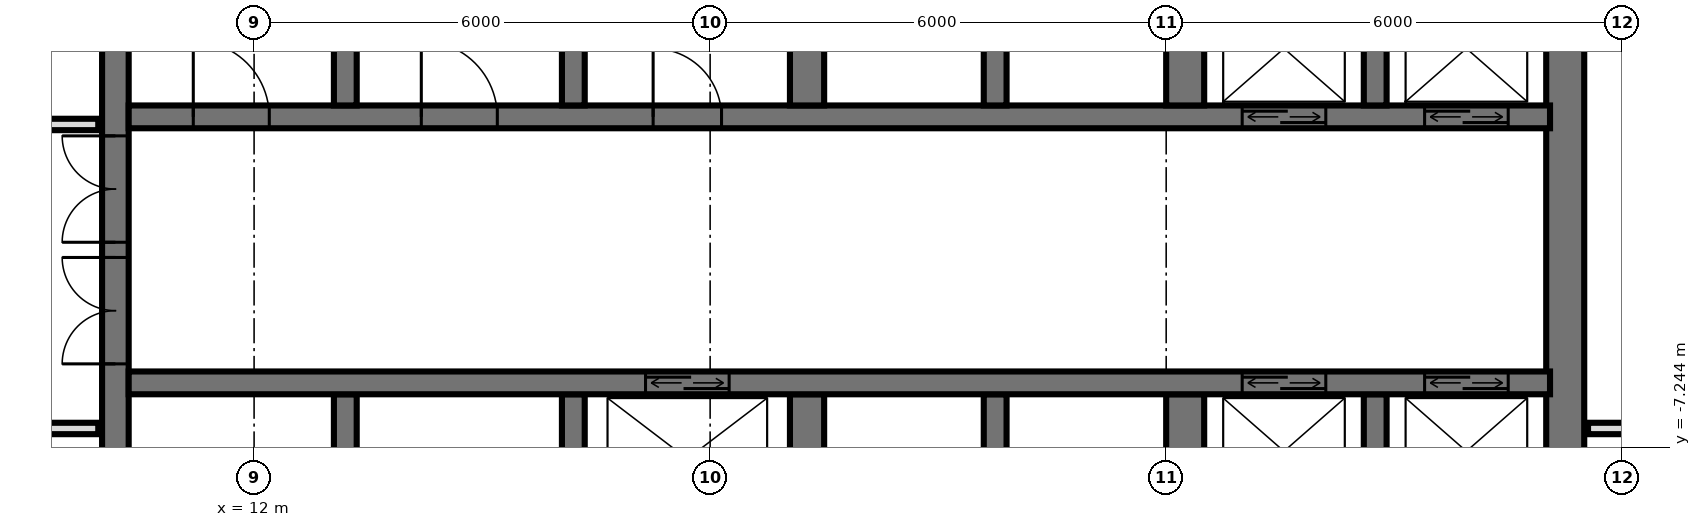
"""IFC4 building model, lengths in metres.
Left out: names, types, materials, properties, quantities, classifications, styles, units other than length and angle.
Written with IfcOpenShell. Run it as: python <this file> out.ifc"""

import sys

from ifc_helpers import new_model, si_unit, direction, frame, frame_2d, origin, place, context, subcontext, project, spatial, rectangle, extrude, element, fill, save


model = new_model("IFC4")
c1 = context("Model", 3, precision=1e-05, world=origin(), true_north=direction((0.0, 1.0)))
c2 = subcontext(c1, "Body", "Model", "MODEL_VIEW")
j1 = project(units=[si_unit("LENGTHUNIT", "METRE"), si_unit("PLANEANGLEUNIT", "RADIAN")], contexts=[c1])
p1 = place(None, origin())
s1 = spatial("IfcSite", under=j1, at=p1, CompositionType="ELEMENT")
p2 = place(p1, origin())
s2 = spatial("IfcBuilding", under=s1, at=p2, CompositionType="ELEMENT")
p3 = place(p2, frame((0.0, 0.0, 103.2)))
s3 = spatial("IfcBuildingStorey", under=s2, at=p3, CompositionType="ELEMENT", Elevation=103.2)
p4 = place(p3, frame((10.175, -14.55, 0.0), z_axis=(0.0, 0.0, 1.0), x_axis=(0.0, 1.0, 0.0)))
e1 = element("IfcWall", 1, at=p4, inside=s3, PredefinedType="SHEAR", context=c2, shape_type="SweptSolid", body=[
    extrude(rectangle(XDim=14.1, YDim=0.35, at=frame_2d((7.05, 0.0))), origin(), (0.0, 0.0, 1.0), 3.6),
])
p5 = place(p4, frame((8.4, 0.0, 0.0)))
e2 = element("IfcOpeningElement", 2, at=p5, cuts=e1, PredefinedType="OPENING", context=c2, shape_type="SweptSolid", body=[
    extrude(rectangle(XDim=1.4, YDim=2.4, at=frame_2d((0.7, 1.2))), frame((0.0, 0.185, 0.0), z_axis=(0.0, -1.0, 0.0), x_axis=(1.0, 0.0, 0.0)), (0.0, 0.0, 1.0), 0.37),
])
p6 = place(p4, frame((10.0, 0.0, 0.0)))
e3 = element("IfcOpeningElement", 3, at=p6, cuts=e1, PredefinedType="OPENING", context=c2, shape_type="SweptSolid", body=[
    extrude(rectangle(XDim=1.4, YDim=2.4, at=frame_2d((0.7, 1.2))), frame((0.0, 0.185, 0.0), z_axis=(0.0, -1.0, 0.0), x_axis=(1.0, 0.0, 0.0)), (0.0, 0.0, 1.0), 0.37),
])
p7 = place(p4, frame((4.0, 0.0, 0.0)))
e4 = element("IfcOpeningElement", 4, at=p7, cuts=e1, PredefinedType="OPENING", context=c2, shape_type="SweptSolid", body=[
    extrude(rectangle(XDim=1.2, YDim=2.1, at=frame_2d((0.6, 1.05))), frame((0.0, 0.185, 0.0), z_axis=(0.0, -1.0, 0.0), x_axis=(1.0, 0.0, 0.0)), (0.0, 0.0, 1.0), 0.37),
])
p8 = place(p3, frame((29.25, -14.55, 0.0), z_axis=(0.0, 0.0, 1.0), x_axis=(0.0, 1.0, 0.0)))
e5 = element("IfcWall", 5, at=p8, inside=s3, PredefinedType="SHEAR", context=c2, shape_type="SweptSolid", body=[
    extrude(rectangle(XDim=14.1, YDim=0.5, at=frame_2d((7.05, 0.0))), origin(), (0.0, 0.0, 1.0), 3.6),
])
p9 = place(p3, frame((10.35, -2.9, 0.0), z_axis=(0.0, 0.0, 1.0), x_axis=(1.0, 0.0, 0.0)))
e6 = element("IfcWall", 6, at=p9, inside=s3, PredefinedType="SHEAR", context=c2, shape_type="SweptSolid", body=[
    extrude(rectangle(XDim=18.7, YDim=0.3, at=frame_2d((9.35, 0.0))), origin(), (0.0, 0.0, 1.0), 3.6),
])
p10 = place(p9, frame((14.65, 0.0, 0.0)))
e7 = element("IfcOpeningElement", 7, at=p10, cuts=e6, PredefinedType="OPENING", context=c2, shape_type="SweptSolid", body=[
    extrude(rectangle(XDim=1.1, YDim=2.1, at=frame_2d((0.55, 1.05))), frame((0.0, 0.16, 0.0), z_axis=(0.0, -1.0, 0.0), x_axis=(1.0, 0.0, 0.0)), (0.0, 0.0, 1.0), 0.32),
])
p11 = place(p9, frame((17.05, 0.0, 0.0)))
e8 = element("IfcOpeningElement", 8, at=p11, cuts=e6, PredefinedType="OPENING", context=c2, shape_type="SweptSolid", body=[
    extrude(rectangle(XDim=1.1, YDim=2.1, at=frame_2d((0.55, 1.05))), frame((0.0, 0.16, 0.0), z_axis=(0.0, -1.0, 0.0), x_axis=(1.0, 0.0, 0.0)), (0.0, 0.0, 1.0), 0.32),
])
p12 = place(p9, frame((6.9, 0.0, 0.0)))
e9 = element("IfcOpeningElement", 9, at=p12, cuts=e6, PredefinedType="OPENING", context=c2, shape_type="SweptSolid", body=[
    extrude(rectangle(XDim=0.9, YDim=2.1, at=frame_2d((0.45, 1.05))), frame((0.0, 0.16, 0.0), z_axis=(0.0, -1.0, 0.0), x_axis=(1.0, 0.0, 0.0)), (0.0, 0.0, 1.0), 0.32),
])
p13 = place(p9, frame((0.85, 0.0, 0.0)))
e10 = element("IfcOpeningElement", 10, at=p13, cuts=e6, PredefinedType="OPENING", context=c2, shape_type="SweptSolid", body=[
    extrude(rectangle(XDim=1.0, YDim=2.1, at=frame_2d((0.5, 1.05))), frame((0.0, 0.16, 0.0), z_axis=(0.0, -1.0, 0.0), x_axis=(1.0, 0.0, 0.0)), (0.0, 0.0, 1.0), 0.32),
])
p14 = place(p9, frame((3.85, 0.0, 0.0)))
e11 = element("IfcOpeningElement", 11, at=p14, cuts=e6, PredefinedType="OPENING", context=c2, shape_type="SweptSolid", body=[
    extrude(rectangle(XDim=1.0, YDim=2.1, at=frame_2d((0.5, 1.05))), frame((0.0, 0.16, 0.0), z_axis=(0.0, -1.0, 0.0), x_axis=(1.0, 0.0, 0.0)), (0.0, 0.0, 1.0), 0.32),
])
p15 = place(p3, frame((10.35, -6.4, 0.0), z_axis=(0.0, 0.0, 1.0), x_axis=(1.0, 0.0, 0.0)))
e12 = element("IfcWall", 12, at=p15, inside=s3, PredefinedType="SHEAR", context=c2, shape_type="SweptSolid", body=[
    extrude(rectangle(XDim=18.7, YDim=0.3, at=frame_2d((9.35, 0.0))), origin(), (0.0, 0.0, 1.0), 3.6),
])
p16 = place(p15, frame((14.65, 0.0, 0.0)))
e13 = element("IfcOpeningElement", 13, at=p16, cuts=e12, PredefinedType="OPENING", context=c2, shape_type="SweptSolid", body=[
    extrude(rectangle(XDim=1.1, YDim=2.1, at=frame_2d((0.55, 1.05))), frame((0.0, 0.16, 0.0), z_axis=(0.0, -1.0, 0.0), x_axis=(1.0, 0.0, 0.0)), (0.0, 0.0, 1.0), 0.32),
])
p17 = place(p15, frame((17.05, 0.0, 0.0)))
e14 = element("IfcOpeningElement", 14, at=p17, cuts=e12, PredefinedType="OPENING", context=c2, shape_type="SweptSolid", body=[
    extrude(rectangle(XDim=1.1, YDim=2.1, at=frame_2d((0.55, 1.05))), frame((0.0, 0.16, 0.0), z_axis=(0.0, -1.0, 0.0), x_axis=(1.0, 0.0, 0.0)), (0.0, 0.0, 1.0), 0.32),
])
p18 = place(p15, frame((6.8, 0.0, 0.0)))
e15 = element("IfcOpeningElement", 15, at=p18, cuts=e12, PredefinedType="OPENING", context=c2, shape_type="SweptSolid", body=[
    extrude(rectangle(XDim=1.1, YDim=2.1, at=frame_2d((0.55, 1.05))), frame((0.0, 0.16, 0.0), z_axis=(0.0, -1.0, 0.0), x_axis=(1.0, 0.0, 0.0)), (0.0, 0.0, 1.0), 0.32),
])
for number, where, z_axis, x_axis in (
    (16, (13.2, -2.75, 0.0), (0.0, 0.0, 1.0), (0.0, 1.0, 0.0)),
    (17, (13.2, -8.85, 0.0), (0.0, 0.0, 1.0), (0.0, 1.0, 0.0)),
    (18, (16.2, -2.75, 0.0), (0.0, 0.0, 1.0), (0.0, 1.0, 0.0)),
    (19, (16.2, -8.85, 0.0), (0.0, 0.0, 1.0), (0.0, 1.0, 0.0)),
):
    element("IfcWall", number, at=place(p3, frame(where, z_axis=z_axis, x_axis=x_axis)), inside=s3, PredefinedType="SHEAR", context=c2, shape_type="SweptSolid", body=[
        extrude(rectangle(XDim=2.3, YDim=0.3, at=frame_2d((1.15, 0.0))), origin(), (0.0, 0.0, 1.0), 3.6),
    ])
for number, where, z_axis, x_axis in (
    (20, (19.275, -2.75, 0.0), (0.0, 0.0, 1.0), (0.0, 1.0, 0.0)),
    (21, (19.275, -8.85, 0.0), (0.0, 0.0, 1.0), (0.0, 1.0, 0.0)),
):
    element("IfcWall", number, at=place(p3, frame(where, z_axis=z_axis, x_axis=x_axis)), inside=s3, PredefinedType="SHEAR", context=c2, shape_type="SweptSolid", body=[
        extrude(rectangle(XDim=2.3, YDim=0.45, at=frame_2d((1.15, 0.0))), origin(), (0.0, 0.0, 1.0), 3.6),
    ])
for number, where, z_axis, x_axis in (
    (22, (21.75, -2.75, 0.0), (0.0, 0.0, 1.0), (0.0, 1.0, 0.0)),
    (23, (21.75, -8.85, 0.0), (0.0, 0.0, 1.0), (0.0, 1.0, 0.0)),
):
    element("IfcWall", number, at=place(p3, frame(where, z_axis=z_axis, x_axis=x_axis)), inside=s3, PredefinedType="SHEAR", context=c2, shape_type="SweptSolid", body=[
        extrude(rectangle(XDim=2.3, YDim=0.3, at=frame_2d((1.15, 0.0))), origin(), (0.0, 0.0, 1.0), 3.6),
    ])
for number, where, z_axis, x_axis in (
    (24, (24.25, -2.75, 0.0), (0.0, 0.0, 1.0), (0.0, 1.0, 0.0)),
    (25, (24.25, -8.85, 0.0), (0.0, 0.0, 1.0), (0.0, 1.0, 0.0)),
):
    element("IfcWall", number, at=place(p3, frame(where, z_axis=z_axis, x_axis=x_axis)), inside=s3, PredefinedType="SHEAR", context=c2, shape_type="SweptSolid", body=[
        extrude(rectangle(XDim=2.3, YDim=0.5, at=frame_2d((1.15, 0.0))), origin(), (0.0, 0.0, 1.0), 3.6),
    ])
for number, where, z_axis, x_axis in (
    (26, (26.75, -2.75, 0.0), (0.0, 0.0, 1.0), (0.0, 1.0, 0.0)),
    (27, (26.75, -8.85, 0.0), (0.0, 0.0, 1.0), (0.0, 1.0, 0.0)),
):
    element("IfcWall", number, at=place(p3, frame(where, z_axis=z_axis, x_axis=x_axis)), inside=s3, PredefinedType="SHEAR", context=c2, shape_type="SweptSolid", body=[
        extrude(rectangle(XDim=2.3, YDim=0.3, at=frame_2d((1.15, 0.0))), origin(), (0.0, 0.0, 1.0), 3.6),
    ])
p19 = place(p3, frame((-9.95, -7.0, 0.0), z_axis=(0.0, 0.0, 1.0), x_axis=(1.0, 0.0, 0.0)))
e28 = element("IfcWall", 28, at=p19, inside=s3, PredefinedType="PARTITIONING", context=c2, shape_type="SweptSolid", body=[
    extrude(rectangle(XDim=19.9, YDim=0.15, at=frame_2d((9.95, 0.0))), origin(), (0.0, 0.0, 1.0), 3.32),
])
p20 = place(p19, frame((9.45, 0.0, 0.0)))
e29 = element("IfcOpeningElement", 29, at=p20, cuts=e28, PredefinedType="OPENING", context=c2, shape_type="SweptSolid", body=[
    extrude(rectangle(XDim=1.0, YDim=2.1, at=frame_2d((0.5, 1.05))), frame((0.0, 0.085, 0.0), z_axis=(0.0, -1.0, 0.0), x_axis=(1.0, 0.0, 0.0)), (0.0, 0.0, 1.0), 0.17),
])
p21 = place(p19, frame((15.45, 0.0, 0.0)))
e30 = element("IfcOpeningElement", 30, at=p21, cuts=e28, PredefinedType="OPENING", context=c2, shape_type="SweptSolid", body=[
    extrude(rectangle(XDim=1.0, YDim=2.1, at=frame_2d((0.5, 1.05))), frame((0.0, 0.085, 0.0), z_axis=(0.0, -1.0, 0.0), x_axis=(1.0, 0.0, 0.0)), (0.0, 0.0, 1.0), 0.17),
])
p22 = place(p3, frame((29.55, -7.0, 0.0), z_axis=(0.0, 0.0, 1.0), x_axis=(1.0, 0.0, 0.0)))
e31 = element("IfcWall", 31, at=p22, inside=s3, PredefinedType="PLUMBINGWALL", context=c2, shape_type="SweptSolid", body=[
    extrude(rectangle(XDim=3.57, YDim=0.15, at=frame_2d((1.785, 0.0))), origin(), (0.0, 0.0, 1.0), 3.32),
])
p23 = place(p22, frame((1.4, 0.0, 0.0)))
e32 = element("IfcOpeningElement", 32, at=p23, cuts=e31, PredefinedType="OPENING", context=c2, shape_type="SweptSolid", body=[
    extrude(rectangle(XDim=0.9, YDim=2.1, at=frame_2d((0.45, 1.05))), frame((0.0, 0.085, 0.0), z_axis=(0.0, -1.0, 0.0), x_axis=(1.0, 0.0, 0.0)), (0.0, 0.0, 1.0), 0.17),
])
p24 = place(p3, frame((-9.95, -3.0, 0.0), z_axis=(0.0, 0.0, 1.0), x_axis=(1.0, 0.0, 0.0)))
e33 = element("IfcWall", 33, at=p24, inside=s3, PredefinedType="PARTITIONING", context=c2, shape_type="SweptSolid", body=[
    extrude(rectangle(XDim=19.9, YDim=0.15, at=frame_2d((9.95, 0.0))), origin(), (0.0, 0.0, 1.0), 3.32),
])
p25 = place(p24, frame((3.45, 0.0, 0.0)))
e34 = element("IfcOpeningElement", 34, at=p25, cuts=e33, PredefinedType="OPENING", context=c2, shape_type="SweptSolid", body=[
    extrude(rectangle(XDim=1.0, YDim=2.1, at=frame_2d((0.5, 1.05))), frame((0.0, 0.085, 0.0), z_axis=(0.0, -1.0, 0.0), x_axis=(1.0, 0.0, 0.0)), (0.0, 0.0, 1.0), 0.17),
])
p26 = place(p24, frame((8.95, 0.0, 0.0)))
e35 = element("IfcOpeningElement", 35, at=p26, cuts=e33, PredefinedType="OPENING", context=c2, shape_type="SweptSolid", body=[
    extrude(rectangle(XDim=1.0, YDim=2.1, at=frame_2d((0.5, 1.05))), frame((0.0, 0.085, 0.0), z_axis=(0.0, -1.0, 0.0), x_axis=(1.0, 0.0, 0.0)), (0.0, 0.0, 1.0), 0.17),
])
p27 = place(p24, frame((11.7, 0.0, 0.0)))
e36 = element("IfcOpeningElement", 36, at=p27, cuts=e33, PredefinedType="OPENING", context=c2, shape_type="SweptSolid", body=[
    extrude(rectangle(XDim=1.0, YDim=2.1, at=frame_2d((0.5, 1.05))), frame((0.0, 0.085, 0.0), z_axis=(0.0, -1.0, 0.0), x_axis=(1.0, 0.0, 0.0)), (0.0, 0.0, 1.0), 0.17),
])
p28 = place(p24, frame((16.2, 0.0, 0.0)))
e37 = element("IfcOpeningElement", 37, at=p28, cuts=e33, PredefinedType="OPENING", context=c2, shape_type="SweptSolid", body=[
    extrude(rectangle(XDim=1.0, YDim=2.1, at=frame_2d((0.5, 1.05))), frame((0.0, 0.085, 0.0), z_axis=(0.0, -1.0, 0.0), x_axis=(1.0, 0.0, 0.0)), (0.0, 0.0, 1.0), 0.17),
])
p29 = place(p10, origin())
e38 = element("IfcDoor", 38, at=p29, inside=s3, OperationType="DOUBLE_DOOR_SLIDING", PredefinedType="USERDEFINED", context=c2, shape_type="SweptSolid", body=[
    extrude(rectangle(XDim=1.1, YDim=2.1, at=frame_2d((0.55, 1.05))), frame((0.0, 0.025, 0.0), z_axis=(0.0, -1.0, 0.0), x_axis=(1.0, 0.0, 0.0)), (0.0, 0.0, 1.0), 0.05),
])
fill(e7, e38)
p30 = place(p11, origin())
e39 = element("IfcDoor", 39, at=p30, inside=s3, OperationType="DOUBLE_DOOR_SLIDING", PredefinedType="USERDEFINED", context=c2, shape_type="SweptSolid", body=[
    extrude(rectangle(XDim=1.1, YDim=2.1, at=frame_2d((0.55, 1.05))), frame((0.0, 0.025, 0.0), z_axis=(0.0, -1.0, 0.0), x_axis=(1.0, 0.0, 0.0)), (0.0, 0.0, 1.0), 0.05),
])
fill(e8, e39)
p31 = place(p16, origin())
e40 = element("IfcDoor", 40, at=p31, inside=s3, OperationType="DOUBLE_DOOR_SLIDING", PredefinedType="USERDEFINED", context=c2, shape_type="SweptSolid", body=[
    extrude(rectangle(XDim=1.1, YDim=2.1, at=frame_2d((0.55, 1.05))), frame((0.0, 0.025, 0.0), z_axis=(0.0, -1.0, 0.0), x_axis=(1.0, 0.0, 0.0)), (0.0, 0.0, 1.0), 0.05),
])
fill(e13, e40)
p32 = place(p17, origin())
e41 = element("IfcDoor", 41, at=p32, inside=s3, OperationType="DOUBLE_DOOR_SLIDING", PredefinedType="USERDEFINED", context=c2, shape_type="SweptSolid", body=[
    extrude(rectangle(XDim=1.1, YDim=2.1, at=frame_2d((0.55, 1.05))), frame((0.0, 0.025, 0.0), z_axis=(0.0, -1.0, 0.0), x_axis=(1.0, 0.0, 0.0)), (0.0, 0.0, 1.0), 0.05),
])
fill(e14, e41)
p33 = place(p18, origin())
e42 = element("IfcDoor", 42, at=p33, inside=s3, OperationType="DOUBLE_DOOR_SLIDING", PredefinedType="USERDEFINED", context=c2, shape_type="SweptSolid", body=[
    extrude(rectangle(XDim=1.1, YDim=2.1, at=frame_2d((0.55, 1.05))), frame((0.0, 0.025, 0.0), z_axis=(0.0, -1.0, 0.0), x_axis=(1.0, 0.0, 0.0)), (0.0, 0.0, 1.0), 0.05),
])
fill(e15, e42)
p34 = place(p5, origin())
e43 = element("IfcDoor", 43, at=p34, inside=s3, OperationType="DOUBLE_DOOR_SINGLE_SWING", PredefinedType="DOOR", context=c2, shape_type="SweptSolid", body=[
    extrude(rectangle(XDim=1.4, YDim=2.4, at=frame_2d((0.7, 1.2))), frame((0.0, 0.025, 0.0), z_axis=(0.0, -1.0, 0.0), x_axis=(1.0, 0.0, 0.0)), (0.0, 0.0, 1.0), 0.05),
])
fill(e2, e43)
p35 = place(p6, origin())
e44 = element("IfcDoor", 44, at=p35, inside=s3, OperationType="DOUBLE_DOOR_SINGLE_SWING", PredefinedType="DOOR", context=c2, shape_type="SweptSolid", body=[
    extrude(rectangle(XDim=1.4, YDim=2.4, at=frame_2d((0.7, 1.2))), frame((0.0, 0.025, 0.0), z_axis=(0.0, -1.0, 0.0), x_axis=(1.0, 0.0, 0.0)), (0.0, 0.0, 1.0), 0.05),
])
fill(e3, e44)
p36 = place(p12, origin())
e45 = element("IfcDoor", 45, at=p36, inside=s3, OperationType="SINGLE_SWING_RIGHT", PredefinedType="DOOR", context=c2, shape_type="SweptSolid", body=[
    extrude(rectangle(XDim=0.9, YDim=2.1, at=frame_2d((0.45, 1.05))), frame((0.0, 0.025, 0.0), z_axis=(0.0, -1.0, 0.0), x_axis=(1.0, 0.0, 0.0)), (0.0, 0.0, 1.0), 0.05),
])
fill(e9, e45)
p37 = place(p13, origin())
e46 = element("IfcDoor", 46, at=p37, inside=s3, OperationType="SINGLE_SWING_RIGHT", PredefinedType="DOOR", context=c2, shape_type="SweptSolid", body=[
    extrude(rectangle(XDim=1.0, YDim=2.1, at=frame_2d((0.5, 1.05))), frame((0.0, 0.025, 0.0), z_axis=(0.0, -1.0, 0.0), x_axis=(1.0, 0.0, 0.0)), (0.0, 0.0, 1.0), 0.05),
])
fill(e10, e46)
p38 = place(p14, origin())
e47 = element("IfcDoor", 47, at=p38, inside=s3, OperationType="SINGLE_SWING_RIGHT", PredefinedType="DOOR", context=c2, shape_type="SweptSolid", body=[
    extrude(rectangle(XDim=1.0, YDim=2.1, at=frame_2d((0.5, 1.05))), frame((0.0, 0.025, 0.0), z_axis=(0.0, -1.0, 0.0), x_axis=(1.0, 0.0, 0.0)), (0.0, 0.0, 1.0), 0.05),
])
fill(e11, e47)
save(model, sys.argv[1])
